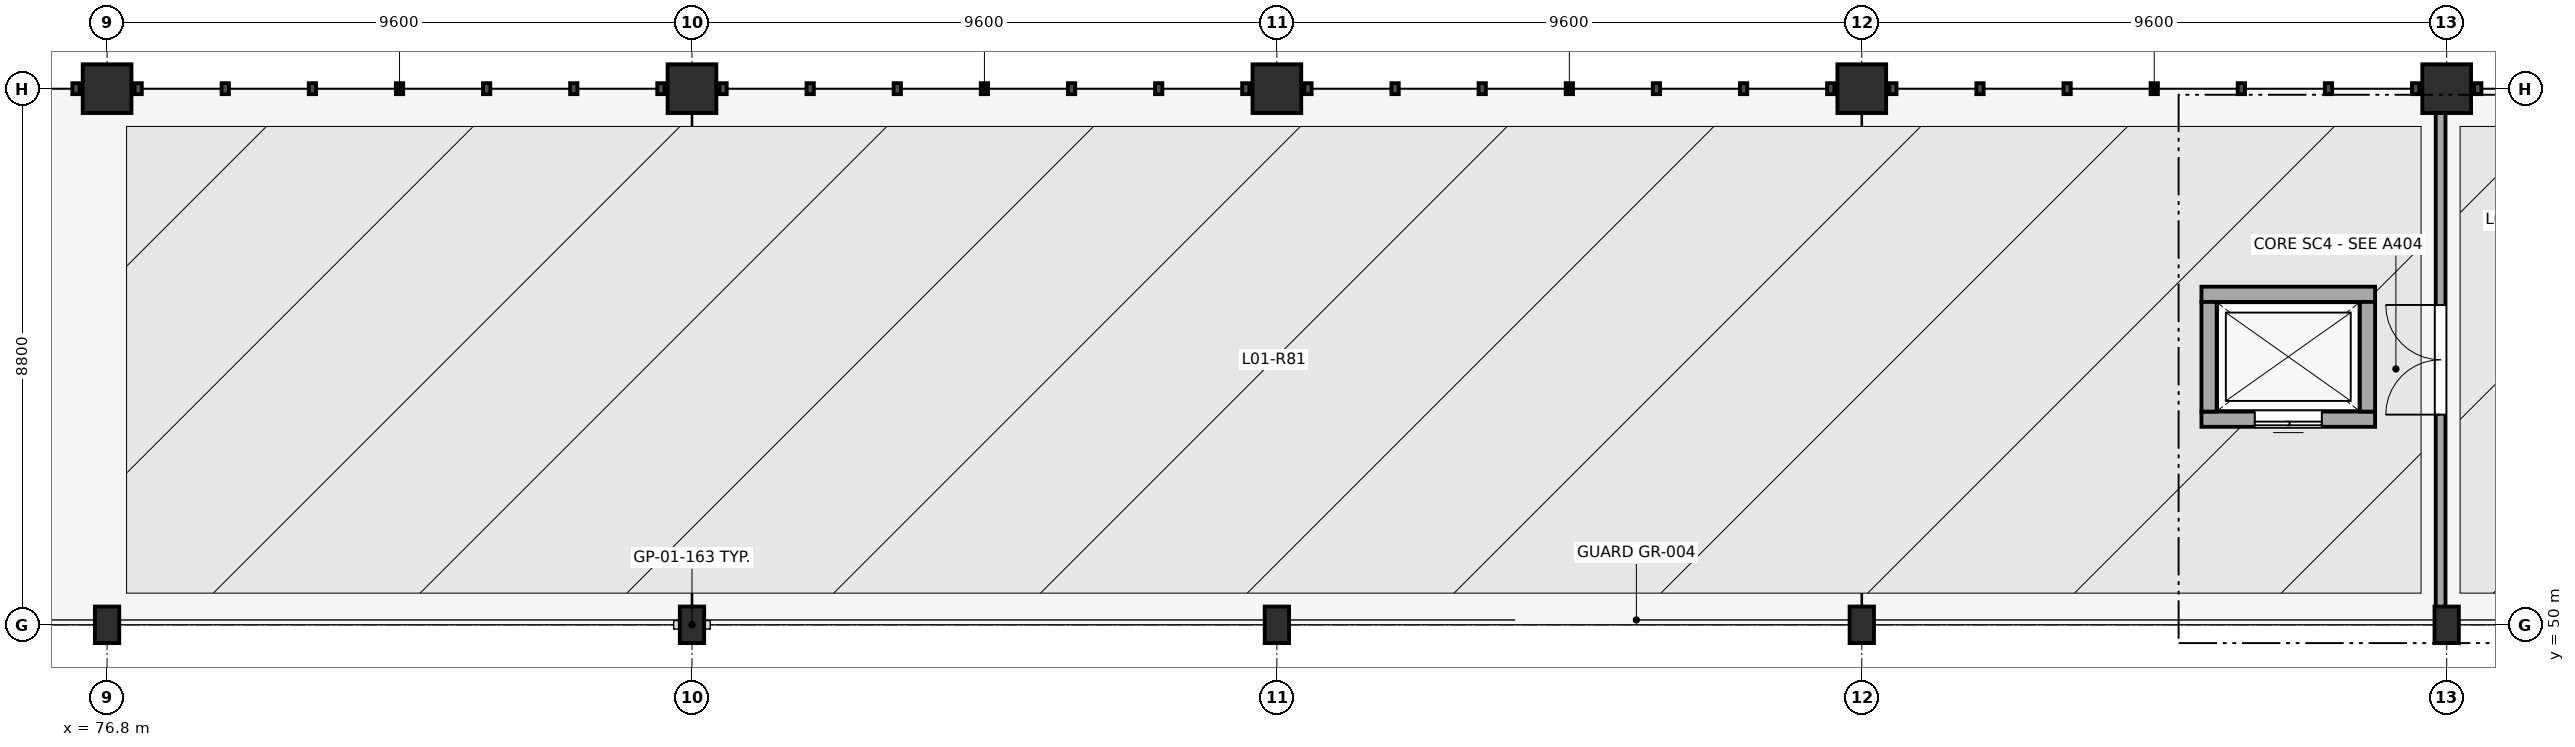
"""IFC4 building model, lengths in metres.
Left out: names, types, materials, properties, quantities, classifications, styles, units other than length and angle.
Written with IfcOpenShell. Run it as: python <this file> out.ifc"""

import sys

from ifc_helpers import new_model, si_unit, direction, frame, frame_2d, origin, origin_2d, place, context, subcontext, project, spatial, rectangle, extrude, element, fill, save


model = new_model("IFC4")
c1 = context("Model", 3, precision=1e-05, world=origin(), true_north=direction((0.0, 1.0)))
c2 = subcontext(c1, "Body", "Model", "MODEL_VIEW")
j1 = project(units=[si_unit("LENGTHUNIT", "METRE"), si_unit("PLANEANGLEUNIT", "RADIAN")], contexts=[c1])
p1 = place(None, origin())
s1 = spatial("IfcSite", under=j1, at=p1, CompositionType="ELEMENT")
p2 = place(p1, origin())
s2 = spatial("IfcBuilding", under=s1, at=p2, CompositionType="ELEMENT")
p3 = place(p2, frame((0.0, 0.0, 4.8)))
s3 = spatial("IfcBuildingStorey", under=s2, at=p3, CompositionType="ELEMENT", Elevation=4.8)
p4 = place(p3, frame((76.8, 50.0, 0.0), z_axis=(0.0, 0.0, 1.0), x_axis=(1.0, 0.0, 0.0)))
e1 = element("IfcColumn", 1, at=p4, inside=s3, PredefinedType="COLUMN", context=c2, shape_type="SweptSolid", body=[
    extrude(rectangle(XDim=0.4, YDim=0.6, at=origin_2d()), origin(), (0.0, 0.0, 1.0), 4.8),
])
p5 = place(p3, frame((76.8, 58.8, 0.0), z_axis=(0.0, 0.0, 1.0), x_axis=(1.0, 0.0, 0.0)))
e2 = element("IfcColumn", 2, at=p5, inside=s3, PredefinedType="COLUMN", context=c2, shape_type="SweptSolid", body=[
    extrude(rectangle(XDim=0.8, YDim=0.8, at=origin_2d()), origin(), (0.0, 0.0, 1.0), 4.8),
])
p6 = place(p3, frame((86.4, 50.0, 0.0), z_axis=(0.0, 0.0, 1.0), x_axis=(1.0, 0.0, 0.0)))
e3 = element("IfcColumn", 3, at=p6, inside=s3, PredefinedType="COLUMN", context=c2, shape_type="SweptSolid", body=[
    extrude(rectangle(XDim=0.4, YDim=0.6, at=origin_2d()), origin(), (0.0, 0.0, 1.0), 4.8),
])
p7 = place(p3, frame((86.4, 58.8, 0.0), z_axis=(0.0, 0.0, 1.0), x_axis=(1.0, 0.0, 0.0)))
e4 = element("IfcColumn", 4, at=p7, inside=s3, PredefinedType="COLUMN", context=c2, shape_type="SweptSolid", body=[
    extrude(rectangle(XDim=0.8, YDim=0.8, at=origin_2d()), origin(), (0.0, 0.0, 1.0), 4.8),
])
p8 = place(p3, frame((96.0, 50.0, 0.0), z_axis=(0.0, 0.0, 1.0), x_axis=(1.0, 0.0, 0.0)))
e5 = element("IfcColumn", 5, at=p8, inside=s3, PredefinedType="COLUMN", context=c2, shape_type="SweptSolid", body=[
    extrude(rectangle(XDim=0.4, YDim=0.6, at=origin_2d()), origin(), (0.0, 0.0, 1.0), 4.8),
])
p9 = place(p3, frame((96.0, 58.8, 0.0), z_axis=(0.0, 0.0, 1.0), x_axis=(1.0, 0.0, 0.0)))
e6 = element("IfcColumn", 6, at=p9, inside=s3, PredefinedType="COLUMN", context=c2, shape_type="SweptSolid", body=[
    extrude(rectangle(XDim=0.8, YDim=0.8, at=origin_2d()), origin(), (0.0, 0.0, 1.0), 4.8),
])
p10 = place(p3, frame((105.6, 50.0, 0.0), z_axis=(0.0, 0.0, 1.0), x_axis=(1.0, 0.0, 0.0)))
e7 = element("IfcColumn", 7, at=p10, inside=s3, PredefinedType="COLUMN", context=c2, shape_type="SweptSolid", body=[
    extrude(rectangle(XDim=0.4, YDim=0.6, at=origin_2d()), origin(), (0.0, 0.0, 1.0), 4.8),
])
p11 = place(p3, frame((105.6, 58.8, 0.0), z_axis=(0.0, 0.0, 1.0), x_axis=(1.0, 0.0, 0.0)))
e8 = element("IfcColumn", 8, at=p11, inside=s3, PredefinedType="COLUMN", context=c2, shape_type="SweptSolid", body=[
    extrude(rectangle(XDim=0.8, YDim=0.8, at=origin_2d()), origin(), (0.0, 0.0, 1.0), 4.8),
])
p12 = place(p3, frame((115.2, 50.0, 0.0), z_axis=(0.0, 0.0, 1.0), x_axis=(1.0, 0.0, 0.0)))
e9 = element("IfcColumn", 9, at=p12, inside=s3, PredefinedType="COLUMN", context=c2, shape_type="SweptSolid", body=[
    extrude(rectangle(XDim=0.4, YDim=0.6, at=origin_2d()), origin(), (0.0, 0.0, 1.0), 4.8),
])
p13 = place(p3, frame((115.2, 58.8, 0.0), z_axis=(0.0, 0.0, 1.0), x_axis=(1.0, 0.0, 0.0)))
e10 = element("IfcColumn", 10, at=p13, inside=s3, PredefinedType="COLUMN", context=c2, shape_type="SweptSolid", body=[
    extrude(rectangle(XDim=0.8, YDim=0.8, at=origin_2d()), origin(), (0.0, 0.0, 1.0), 4.8),
])
p14 = place(p3, frame((114.025, 53.375, 0.0), z_axis=(0.0, 0.0, 1.0), x_axis=(-1.0, 0.0, 0.0)))
e11 = element("IfcWall", 11, at=p14, inside=s3, PredefinedType="SOLIDWALL", context=c2, shape_type="SweptSolid", body=[
    extrude(rectangle(XDim=2.85, YDim=0.25, at=frame_2d((1.425, 0.0))), origin(), (0.0, 0.0, 1.0), 4.55),
])
p15 = place(p14, frame((0.875, 0.0, 0.0)))
e12 = element("IfcOpeningElement", 12, at=p15, cuts=e11, PredefinedType="OPENING", context=c2, shape_type="SweptSolid", body=[
    extrude(rectangle(XDim=1.1, YDim=2.15, at=frame_2d((0.55, 1.075))), frame((0.0, 0.135, 0.0), z_axis=(0.0, -1.0, 0.0), x_axis=(1.0, 0.0, 0.0)), (0.0, 0.0, 1.0), 0.27),
])
p16 = place(p3, frame((111.175, 55.425, 0.0), z_axis=(0.0, 0.0, 1.0), x_axis=(1.0, 0.0, 0.0)))
e13 = element("IfcWall", 13, at=p16, inside=s3, PredefinedType="SOLIDWALL", context=c2, shape_type="SweptSolid", body=[
    extrude(rectangle(XDim=2.85, YDim=0.25, at=frame_2d((1.425, 0.0))), origin(), (0.0, 0.0, 1.0), 4.55),
])
for number, where, z_axis, x_axis in (
    (14, (111.3, 53.5, 0.0), (0.0, 0.0, 1.0), (0.0, 1.0, 0.0)),
    (15, (113.9, 55.3, 0.0), (0.0, 0.0, 1.0), (0.0, -1.0, 0.0)),
):
    element("IfcWall", number, at=place(p3, frame(where, z_axis=z_axis, x_axis=x_axis)), inside=s3, PredefinedType="SOLIDWALL", context=c2, shape_type="SweptSolid", body=[
        extrude(rectangle(XDim=1.8, YDim=0.25, at=frame_2d((0.9, 0.0))), origin(), (0.0, 0.0, 1.0), 4.55),
    ])
p17 = place(p3, frame((115.1, 49.95, 0.0), z_axis=(0.0, 0.0, 1.0), x_axis=(0.0, 1.0, 0.0)))
e16 = element("IfcWall", 16, at=p17, inside=s3, PredefinedType="PARTITIONING", context=c2, shape_type="SweptSolid", body=[
    extrude(rectangle(XDim=8.8, YDim=0.16, at=frame_2d((4.4, 0.0))), origin(), (0.0, 0.0, 1.0), 4.096),
])
p18 = place(p17, frame((3.5, 0.0, 0.0)))
e17 = element("IfcOpeningElement", 17, at=p18, cuts=e16, PredefinedType="OPENING", context=c2, shape_type="SweptSolid", body=[
    extrude(rectangle(XDim=1.8, YDim=2.15, at=frame_2d((0.9, 1.075))), frame((0.0, 0.09, 0.0), z_axis=(0.0, -1.0, 0.0), x_axis=(1.0, 0.0, 0.0)), (0.0, 0.0, 1.0), 0.18),
])
p19 = place(p15, origin())
e18 = element("IfcDoor", 18, at=p19, inside=s3, OperationType="DOUBLE_DOOR_SLIDING", PredefinedType="DOOR", context=c2, shape_type="SweptSolid", body=[
    extrude(rectangle(XDim=1.1, YDim=2.15, at=frame_2d((0.55, 1.075))), frame((0.0, 0.025, 0.0), z_axis=(0.0, -1.0, 0.0), x_axis=(1.0, 0.0, 0.0)), (0.0, 0.0, 1.0), 0.05),
])
fill(e12, e18)
p20 = place(p18, origin())
e19 = element("IfcDoor", 19, at=p20, inside=s3, OperationType="DOUBLE_DOOR_SINGLE_SWING", PredefinedType="DOOR", context=c2, shape_type="SweptSolid", body=[
    extrude(rectangle(XDim=1.8, YDim=2.15, at=frame_2d((0.9, 1.075))), frame((0.0, 0.025, 0.0), z_axis=(0.0, -1.0, 0.0), x_axis=(1.0, 0.0, 0.0)), (0.0, 0.0, 1.0), 0.05),
])
fill(e17, e19)
save(model, sys.argv[1])
